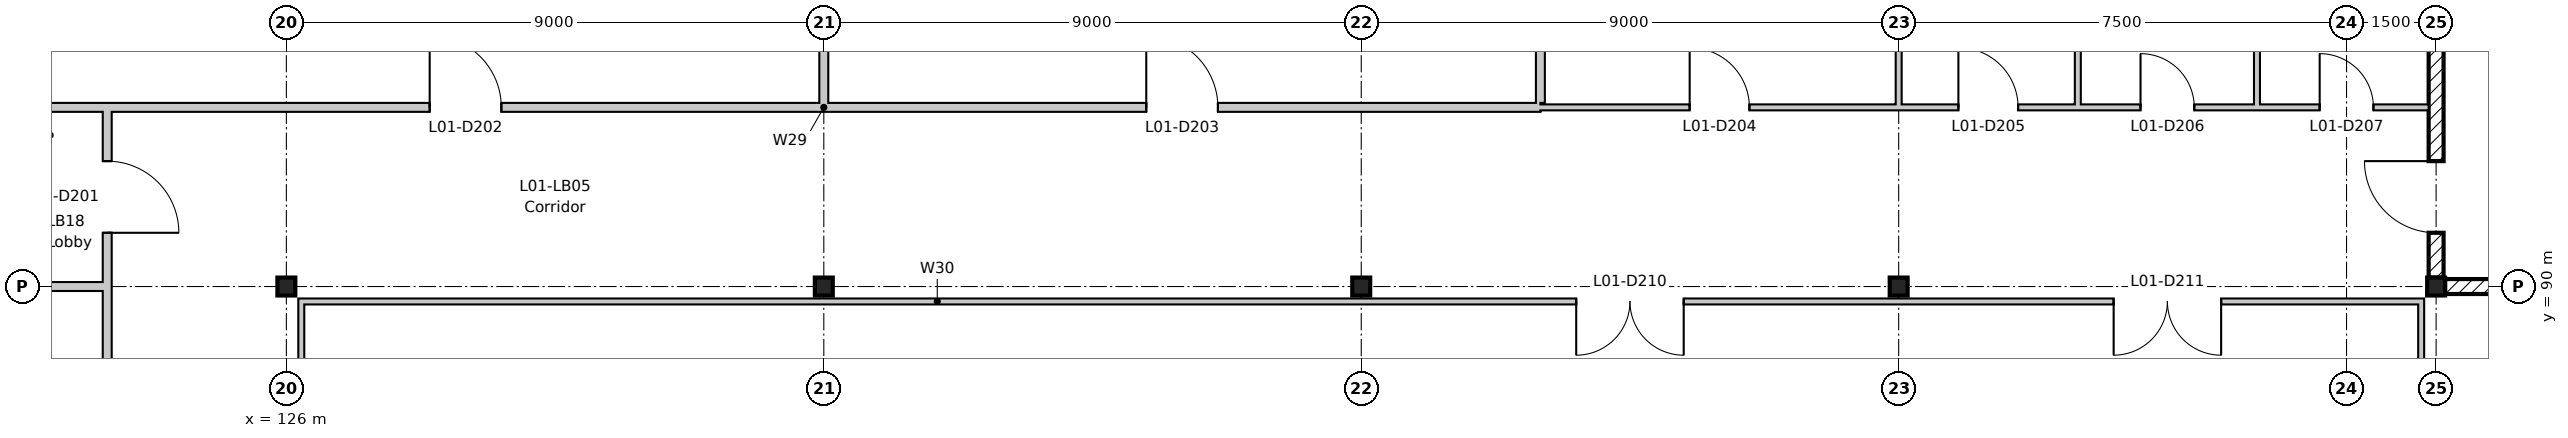
"""IFC4 building model, lengths in metres.
Left out: names, types, materials, properties, quantities, classifications, styles, units other than length and angle.
Written with IfcOpenShell. Run it as: python <this file> out.ifc"""

import sys

from ifc_helpers import new_model, si_unit, direction, frame, frame_2d, origin, origin_2d, place, context, subcontext, project, spatial, rectangle, i_section, extrude, element, fill, save


model = new_model("IFC4")
c1 = context("Model", 3, precision=1e-05, world=origin(), true_north=direction((0.0, 1.0)))
c2 = subcontext(c1, "Body", "Model", "MODEL_VIEW")
j1 = project(units=[si_unit("LENGTHUNIT", "METRE"), si_unit("PLANEANGLEUNIT", "RADIAN")], contexts=[c1])
p1 = place(None, origin())
s1 = spatial("IfcSite", under=j1, at=p1, CompositionType="ELEMENT")
p2 = place(p1, origin())
s2 = spatial("IfcBuilding", under=s1, at=p2, CompositionType="ELEMENT")
p3 = place(p2, frame((0.0, 0.0, 5.4)))
s3 = spatial("IfcBuildingStorey", under=s2, at=p3, CompositionType="ELEMENT", Elevation=5.4)
for number, where, z_axis, x_axis in (
    (1, (126.0, 90.0, -0.2), (0.0, 0.0, 1.0), (1.0, 0.0, 0.0)),
    (2, (135.0, 90.0, -0.2), (0.0, 0.0, 1.0), (1.0, 0.0, 0.0)),
    (3, (144.0, 90.0, -0.2), (0.0, 0.0, 1.0), (1.0, 0.0, 0.0)),
    (4, (153.0, 90.0, -0.2), (0.0, 0.0, 1.0), (1.0, 0.0, 0.0)),
    (5, (162.0, 90.0, -0.2), (0.0, 0.0, 1.0), (1.0, 0.0, 0.0)),
):
    element("IfcColumn", number, at=place(p3, frame(where, z_axis=z_axis, x_axis=x_axis)), inside=s3, PredefinedType="COLUMN", context=c2, shape_type="SweptSolid", body=[
        extrude(i_section(OverallWidth=0.3, OverallDepth=0.3, WebThickness=0.011, FlangeThickness=0.019, FilletRadius=0.027, at=origin_2d()), origin(), (0.0, 0.0, 1.0), 4.5),
    ])
p4 = place(p3, frame((162.0, 98.8, 0.0), z_axis=(0.0, 0.0, 1.0), x_axis=(0.0, -1.0, 0.0)))
e6 = element("IfcWall", 6, at=p4, inside=s3, PredefinedType="SHEAR", context=c2, shape_type="SweptSolid", body=[
    extrude(rectangle(XDim=8.65, YDim=0.25, at=frame_2d((4.325, 0.0))), origin(), (0.0, 0.0, 1.0), 4.3),
])
p5 = place(p4, frame((6.7, 0.0, 0.0)))
e7 = element("IfcOpeningElement", 7, at=p5, cuts=e6, PredefinedType="OPENING", context=c2, shape_type="SweptSolid", body=[
    extrude(rectangle(XDim=1.2, YDim=2.1, at=frame_2d((0.6, 1.05))), frame((0.0, 0.135, 0.0), z_axis=(0.0, -1.0, 0.0), x_axis=(1.0, 0.0, 0.0)), (0.0, 0.0, 1.0), 0.27),
])
p6 = place(p3, frame((170.8, 90.0, 0.0), z_axis=(0.0, 0.0, 1.0), x_axis=(-1.0, 0.0, 0.0)))
e8 = element("IfcWall", 8, at=p6, inside=s3, PredefinedType="SHEAR", context=c2, shape_type="SweptSolid", body=[
    extrude(rectangle(XDim=8.65, YDim=0.25, at=frame_2d((4.325, 0.0))), origin(), (0.0, 0.0, 1.0), 4.3),
])
p7 = place(p6, frame((6.6, 0.0, 0.0)))
e9 = element("IfcOpeningElement", 9, at=p7, cuts=e8, PredefinedType="OPENING", context=c2, shape_type="SweptSolid", body=[
    extrude(rectangle(XDim=1.2, YDim=2.1, at=frame_2d((0.6, 1.05))), frame((0.0, 0.135, 0.0), z_axis=(0.0, -1.0, 0.0), x_axis=(1.0, 0.0, 0.0)), (0.0, 0.0, 1.0), 0.27),
])
p8 = place(p3, frame((120.3, 90.0, 0.0), z_axis=(0.0, 0.0, 1.0), x_axis=(1.0, 0.0, 0.0)))
e10 = element("IfcWall", 10, at=p8, inside=s3, PredefinedType="PARTITIONING", context=c2, shape_type="SweptSolid", body=[
    extrude(rectangle(XDim=2.625, YDim=0.15, at=frame_2d((1.312, 0.0))), origin(), (0.0, 0.0, 1.0), 3.78),
])
p9 = place(p3, frame((120.3, 93.0, 0.0), z_axis=(0.0, 0.0, 1.0), x_axis=(1.0, 0.0, 0.0)))
e11 = element("IfcWall", 11, at=p9, inside=s3, PredefinedType="PARTITIONING", context=c2, shape_type="SweptSolid", body=[
    extrude(rectangle(XDim=26.7, YDim=0.15, at=frame_2d((13.35, 0.0))), origin(), (0.0, 0.0, 1.0), 3.78),
])
p10 = place(p9, frame((8.1, 0.0, 0.0)))
e12 = element("IfcOpeningElement", 12, at=p10, cuts=e11, PredefinedType="OPENING", context=c2, shape_type="SweptSolid", body=[
    extrude(rectangle(XDim=1.2, YDim=2.1, at=frame_2d((0.6, 1.05))), frame((0.0, 0.085, 0.0), z_axis=(0.0, -1.0, 0.0), x_axis=(1.0, 0.0, 0.0)), (0.0, 0.0, 1.0), 0.17),
])
p11 = place(p9, frame((20.1, 0.0, 0.0)))
e13 = element("IfcOpeningElement", 13, at=p11, cuts=e11, PredefinedType="OPENING", context=c2, shape_type="SweptSolid", body=[
    extrude(rectangle(XDim=1.2, YDim=2.1, at=frame_2d((0.6, 1.05))), frame((0.0, 0.085, 0.0), z_axis=(0.0, -1.0, 0.0), x_axis=(1.0, 0.0, 0.0)), (0.0, 0.0, 1.0), 0.17),
])
p12 = place(p3, frame((147.0, 93.0, 0.0), z_axis=(0.0, 0.0, 1.0), x_axis=(1.0, 0.0, 0.0)))
e14 = element("IfcWall", 14, at=p12, inside=s3, PredefinedType="PARTITIONING", context=c2, shape_type="SweptSolid", body=[
    extrude(rectangle(XDim=14.875, YDim=0.1, at=frame_2d((7.438, 0.0))), origin(), (0.0, 0.0, 1.0), 3.78),
])
p13 = place(p12, frame((2.5, 0.0, 0.0)))
e15 = element("IfcOpeningElement", 15, at=p13, cuts=e14, PredefinedType="OPENING", context=c2, shape_type="SweptSolid", body=[
    extrude(rectangle(XDim=1.0, YDim=2.1, at=frame_2d((0.5, 1.05))), frame((0.0, 0.06, 0.0), z_axis=(0.0, -1.0, 0.0), x_axis=(1.0, 0.0, 0.0)), (0.0, 0.0, 1.0), 0.12),
])
p14 = place(p12, frame((7.0, 0.0, 0.0)))
e16 = element("IfcOpeningElement", 16, at=p14, cuts=e14, PredefinedType="OPENING", context=c2, shape_type="SweptSolid", body=[
    extrude(rectangle(XDim=1.0, YDim=2.1, at=frame_2d((0.5, 1.05))), frame((0.0, 0.06, 0.0), z_axis=(0.0, -1.0, 0.0), x_axis=(1.0, 0.0, 0.0)), (0.0, 0.0, 1.0), 0.12),
])
p15 = place(p12, frame((10.05, 0.0, 0.0)))
e17 = element("IfcOpeningElement", 17, at=p15, cuts=e14, PredefinedType="OPENING", context=c2, shape_type="SweptSolid", body=[
    extrude(rectangle(XDim=0.9, YDim=2.1, at=frame_2d((0.45, 1.05))), frame((0.0, 0.06, 0.0), z_axis=(0.0, -1.0, 0.0), x_axis=(1.0, 0.0, 0.0)), (0.0, 0.0, 1.0), 0.12),
])
p16 = place(p12, frame((13.05, 0.0, 0.0)))
e18 = element("IfcOpeningElement", 18, at=p16, cuts=e14, PredefinedType="OPENING", context=c2, shape_type="SweptSolid", body=[
    extrude(rectangle(XDim=0.9, YDim=2.1, at=frame_2d((0.45, 1.05))), frame((0.0, 0.06, 0.0), z_axis=(0.0, -1.0, 0.0), x_axis=(1.0, 0.0, 0.0)), (0.0, 0.0, 1.0), 0.12),
])
p17 = place(p3, frame((123.0, 72.125, 0.0), z_axis=(0.0, 0.0, 1.0), x_axis=(0.0, 1.0, 0.0)))
e19 = element("IfcWall", 19, at=p17, inside=s3, PredefinedType="PARTITIONING", context=c2, shape_type="SweptSolid", body=[
    extrude(rectangle(XDim=20.8, YDim=0.15, at=frame_2d((10.4, 0.0))), origin(), (0.0, 0.0, 1.0), 3.78),
])
p18 = place(p17, frame((3.875, 0.0, 0.0)))
e20 = element("IfcOpeningElement", 20, at=p18, cuts=e19, PredefinedType="OPENING", context=c2, shape_type="SweptSolid", body=[
    extrude(rectangle(XDim=1.0, YDim=2.1, at=frame_2d((0.5, 1.05))), frame((0.0, 0.085, 0.0), z_axis=(0.0, -1.0, 0.0), x_axis=(1.0, 0.0, 0.0)), (0.0, 0.0, 1.0), 0.17),
])
p19 = place(p17, frame((12.875, 0.0, 0.0)))
e21 = element("IfcOpeningElement", 21, at=p19, cuts=e19, PredefinedType="OPENING", context=c2, shape_type="SweptSolid", body=[
    extrude(rectangle(XDim=1.0, YDim=2.1, at=frame_2d((0.5, 1.05))), frame((0.0, 0.085, 0.0), z_axis=(0.0, -1.0, 0.0), x_axis=(1.0, 0.0, 0.0)), (0.0, 0.0, 1.0), 0.17),
])
p20 = place(p17, frame((18.775, 0.0, 0.0)))
e22 = element("IfcOpeningElement", 22, at=p20, cuts=e19, PredefinedType="OPENING", context=c2, shape_type="SweptSolid", body=[
    extrude(rectangle(XDim=1.2, YDim=2.1, at=frame_2d((0.6, 1.05))), frame((0.0, 0.085, 0.0), z_axis=(0.0, -1.0, 0.0), x_axis=(1.0, 0.0, 0.0)), (0.0, 0.0, 1.0), 0.17),
])
for number, where, z_axis, x_axis in (
    (23, (135.0, 93.075, 0.0), (0.0, 0.0, 1.0), (0.0, 1.0, 0.0)),
    (24, (147.0, 93.075, 0.0), (0.0, 0.0, 1.0), (0.0, 1.0, 0.0)),
):
    element("IfcWall", number, at=place(p3, frame(where, z_axis=z_axis, x_axis=x_axis)), inside=s3, PredefinedType="PARTITIONING", context=c2, shape_type="SweptSolid", body=[
        extrude(rectangle(XDim=5.725, YDim=0.15, at=frame_2d((2.863, 0.0))), origin(), (0.0, 0.0, 1.0), 3.78),
    ])
for number, where, z_axis, x_axis in (
    (25, (153.0, 93.05, 0.0), (0.0, 0.0, 1.0), (0.0, 1.0, 0.0)),
    (26, (156.0, 93.05, 0.0), (0.0, 0.0, 1.0), (0.0, 1.0, 0.0)),
    (27, (159.0, 93.05, 0.0), (0.0, 0.0, 1.0), (0.0, 1.0, 0.0)),
):
    element("IfcWall", number, at=place(p3, frame(where, z_axis=z_axis, x_axis=x_axis)), inside=s3, PredefinedType="PARTITIONING", context=c2, shape_type="SweptSolid", body=[
        extrude(rectangle(XDim=5.75, YDim=0.1, at=frame_2d((2.875, 0.0))), origin(), (0.0, 0.0, 1.0), 3.78),
    ])
p21 = place(p3, frame((126.2, 89.75, 0.0), z_axis=(0.0, 0.0, 1.0), x_axis=(1.0, 0.0, 0.0)))
e28 = element("IfcWall", 28, at=p21, inside=s3, PredefinedType="PARTITIONING", context=c2, shape_type="SweptSolid", body=[
    extrude(rectangle(XDim=35.6, YDim=0.1, at=frame_2d((17.8, 0.0))), origin(), (0.0, 0.0, 1.0), 4.3),
])
p22 = place(p21, frame((21.4, 0.0, 0.0)))
e29 = element("IfcOpeningElement", 29, at=p22, cuts=e28, PredefinedType="OPENING", context=c2, shape_type="SweptSolid", body=[
    extrude(rectangle(XDim=1.8, YDim=2.1, at=frame_2d((0.9, 1.05))), frame((0.0, 0.06, 0.0), z_axis=(0.0, -1.0, 0.0), x_axis=(1.0, 0.0, 0.0)), (0.0, 0.0, 1.0), 0.12),
])
p23 = place(p21, frame((30.4, 0.0, 0.0)))
e30 = element("IfcOpeningElement", 30, at=p23, cuts=e28, PredefinedType="OPENING", context=c2, shape_type="SweptSolid", body=[
    extrude(rectangle(XDim=1.8, YDim=2.1, at=frame_2d((0.9, 1.05))), frame((0.0, 0.06, 0.0), z_axis=(0.0, -1.0, 0.0), x_axis=(1.0, 0.0, 0.0)), (0.0, 0.0, 1.0), 0.12),
])
p24 = place(p3, frame((126.25, 72.3, 0.0), z_axis=(0.0, 0.0, 1.0), x_axis=(0.0, 1.0, 0.0)))
e31 = element("IfcWall", 31, at=p24, inside=s3, PredefinedType="PARTITIONING", context=c2, shape_type="SweptSolid", body=[
    extrude(rectangle(XDim=17.4, YDim=0.1, at=frame_2d((8.7, 0.0))), origin(), (0.0, 0.0, 1.0), 4.3),
])
p25 = place(p24, frame((3.3, 0.0, 0.0)))
e32 = element("IfcOpeningElement", 32, at=p25, cuts=e31, PredefinedType="OPENING", context=c2, shape_type="SweptSolid", body=[
    extrude(rectangle(XDim=1.8, YDim=2.1, at=frame_2d((0.9, 1.05))), frame((0.0, 0.06, 0.0), z_axis=(0.0, -1.0, 0.0), x_axis=(1.0, 0.0, 0.0)), (0.0, 0.0, 1.0), 0.12),
])
p26 = place(p3, frame((161.75, 72.3, 0.0), z_axis=(0.0, 0.0, 1.0), x_axis=(0.0, 1.0, 0.0)))
e33 = element("IfcWall", 33, at=p26, inside=s3, PredefinedType="PARTITIONING", context=c2, shape_type="SweptSolid", body=[
    extrude(rectangle(XDim=17.4, YDim=0.1, at=frame_2d((8.7, 0.0))), origin(), (0.0, 0.0, 1.0), 4.3),
])
p27 = place(p26, frame((12.3, 0.0, 0.0)))
e34 = element("IfcOpeningElement", 34, at=p27, cuts=e33, PredefinedType="OPENING", context=c2, shape_type="SweptSolid", body=[
    extrude(rectangle(XDim=1.8, YDim=2.1, at=frame_2d((0.9, 1.05))), frame((0.0, 0.06, 0.0), z_axis=(0.0, -1.0, 0.0), x_axis=(1.0, 0.0, 0.0)), (0.0, 0.0, 1.0), 0.12),
])
p28 = place(p20, frame((1.2, 0.0, 0.0), z_axis=(0.0, 0.0, 1.0), x_axis=(-1.0, 0.0, 0.0)))
e35 = element("IfcDoor", 35, at=p28, inside=s3, OperationType="SINGLE_SWING_RIGHT", PredefinedType="DOOR", context=c2, shape_type="SweptSolid", body=[
    extrude(rectangle(XDim=1.2, YDim=2.1, at=frame_2d((0.6, 1.05))), frame((0.0, 0.025, 0.0), z_axis=(0.0, -1.0, 0.0), x_axis=(1.0, 0.0, 0.0)), (0.0, 0.0, 1.0), 0.05),
])
fill(e22, e35)
p29 = place(p10, origin())
e36 = element("IfcDoor", 36, at=p29, inside=s3, OperationType="SINGLE_SWING_LEFT", PredefinedType="DOOR", context=c2, shape_type="SweptSolid", body=[
    extrude(rectangle(XDim=1.2, YDim=2.1, at=frame_2d((0.6, 1.05))), frame((0.0, 0.025, 0.0), z_axis=(0.0, -1.0, 0.0), x_axis=(1.0, 0.0, 0.0)), (0.0, 0.0, 1.0), 0.05),
])
fill(e12, e36)
p30 = place(p11, origin())
e37 = element("IfcDoor", 37, at=p30, inside=s3, OperationType="SINGLE_SWING_LEFT", PredefinedType="DOOR", context=c2, shape_type="SweptSolid", body=[
    extrude(rectangle(XDim=1.2, YDim=2.1, at=frame_2d((0.6, 1.05))), frame((0.0, 0.025, 0.0), z_axis=(0.0, -1.0, 0.0), x_axis=(1.0, 0.0, 0.0)), (0.0, 0.0, 1.0), 0.05),
])
fill(e13, e37)
p31 = place(p13, origin())
e38 = element("IfcDoor", 38, at=p31, inside=s3, OperationType="SINGLE_SWING_LEFT", PredefinedType="DOOR", context=c2, shape_type="SweptSolid", body=[
    extrude(rectangle(XDim=1.0, YDim=2.1, at=frame_2d((0.5, 1.05))), frame((0.0, 0.025, 0.0), z_axis=(0.0, -1.0, 0.0), x_axis=(1.0, 0.0, 0.0)), (0.0, 0.0, 1.0), 0.05),
])
fill(e15, e38)
p32 = place(p14, origin())
e39 = element("IfcDoor", 39, at=p32, inside=s3, OperationType="SINGLE_SWING_LEFT", PredefinedType="DOOR", context=c2, shape_type="SweptSolid", body=[
    extrude(rectangle(XDim=1.0, YDim=2.1, at=frame_2d((0.5, 1.05))), frame((0.0, 0.025, 0.0), z_axis=(0.0, -1.0, 0.0), x_axis=(1.0, 0.0, 0.0)), (0.0, 0.0, 1.0), 0.05),
])
fill(e16, e39)
p33 = place(p15, origin())
e40 = element("IfcDoor", 40, at=p33, inside=s3, OperationType="SINGLE_SWING_LEFT", PredefinedType="DOOR", context=c2, shape_type="SweptSolid", body=[
    extrude(rectangle(XDim=0.9, YDim=2.1, at=frame_2d((0.45, 1.05))), frame((0.0, 0.025, 0.0), z_axis=(0.0, -1.0, 0.0), x_axis=(1.0, 0.0, 0.0)), (0.0, 0.0, 1.0), 0.05),
])
fill(e17, e40)
p34 = place(p16, origin())
e41 = element("IfcDoor", 41, at=p34, inside=s3, OperationType="SINGLE_SWING_LEFT", PredefinedType="DOOR", context=c2, shape_type="SweptSolid", body=[
    extrude(rectangle(XDim=0.9, YDim=2.1, at=frame_2d((0.45, 1.05))), frame((0.0, 0.025, 0.0), z_axis=(0.0, -1.0, 0.0), x_axis=(1.0, 0.0, 0.0)), (0.0, 0.0, 1.0), 0.05),
])
fill(e18, e41)
p35 = place(p22, frame((1.8, 0.0, 0.0), z_axis=(0.0, 0.0, 1.0), x_axis=(-1.0, 0.0, 0.0)))
e42 = element("IfcDoor", 42, at=p35, inside=s3, OperationType="DOUBLE_DOOR_SINGLE_SWING", PredefinedType="DOOR", context=c2, shape_type="SweptSolid", body=[
    extrude(rectangle(XDim=1.8, YDim=2.1, at=frame_2d((0.9, 1.05))), frame((0.0, 0.025, 0.0), z_axis=(0.0, -1.0, 0.0), x_axis=(1.0, 0.0, 0.0)), (0.0, 0.0, 1.0), 0.05),
])
fill(e29, e42)
p36 = place(p23, frame((1.8, 0.0, 0.0), z_axis=(0.0, 0.0, 1.0), x_axis=(-1.0, 0.0, 0.0)))
e43 = element("IfcDoor", 43, at=p36, inside=s3, OperationType="DOUBLE_DOOR_SINGLE_SWING", PredefinedType="DOOR", context=c2, shape_type="SweptSolid", body=[
    extrude(rectangle(XDim=1.8, YDim=2.1, at=frame_2d((0.9, 1.05))), frame((0.0, 0.025, 0.0), z_axis=(0.0, -1.0, 0.0), x_axis=(1.0, 0.0, 0.0)), (0.0, 0.0, 1.0), 0.05),
])
fill(e30, e43)
p37 = place(p5, frame((1.2, 0.0, 0.0), z_axis=(0.0, 0.0, 1.0), x_axis=(-1.0, 0.0, 0.0)))
e44 = element("IfcDoor", 44, at=p37, inside=s3, OperationType="SINGLE_SWING_RIGHT", PredefinedType="DOOR", context=c2, shape_type="SweptSolid", body=[
    extrude(rectangle(XDim=1.2, YDim=2.1, at=frame_2d((0.6, 1.05))), frame((0.0, 0.025, 0.0), z_axis=(0.0, -1.0, 0.0), x_axis=(1.0, 0.0, 0.0)), (0.0, 0.0, 1.0), 0.05),
])
fill(e7, e44)
save(model, sys.argv[1])
